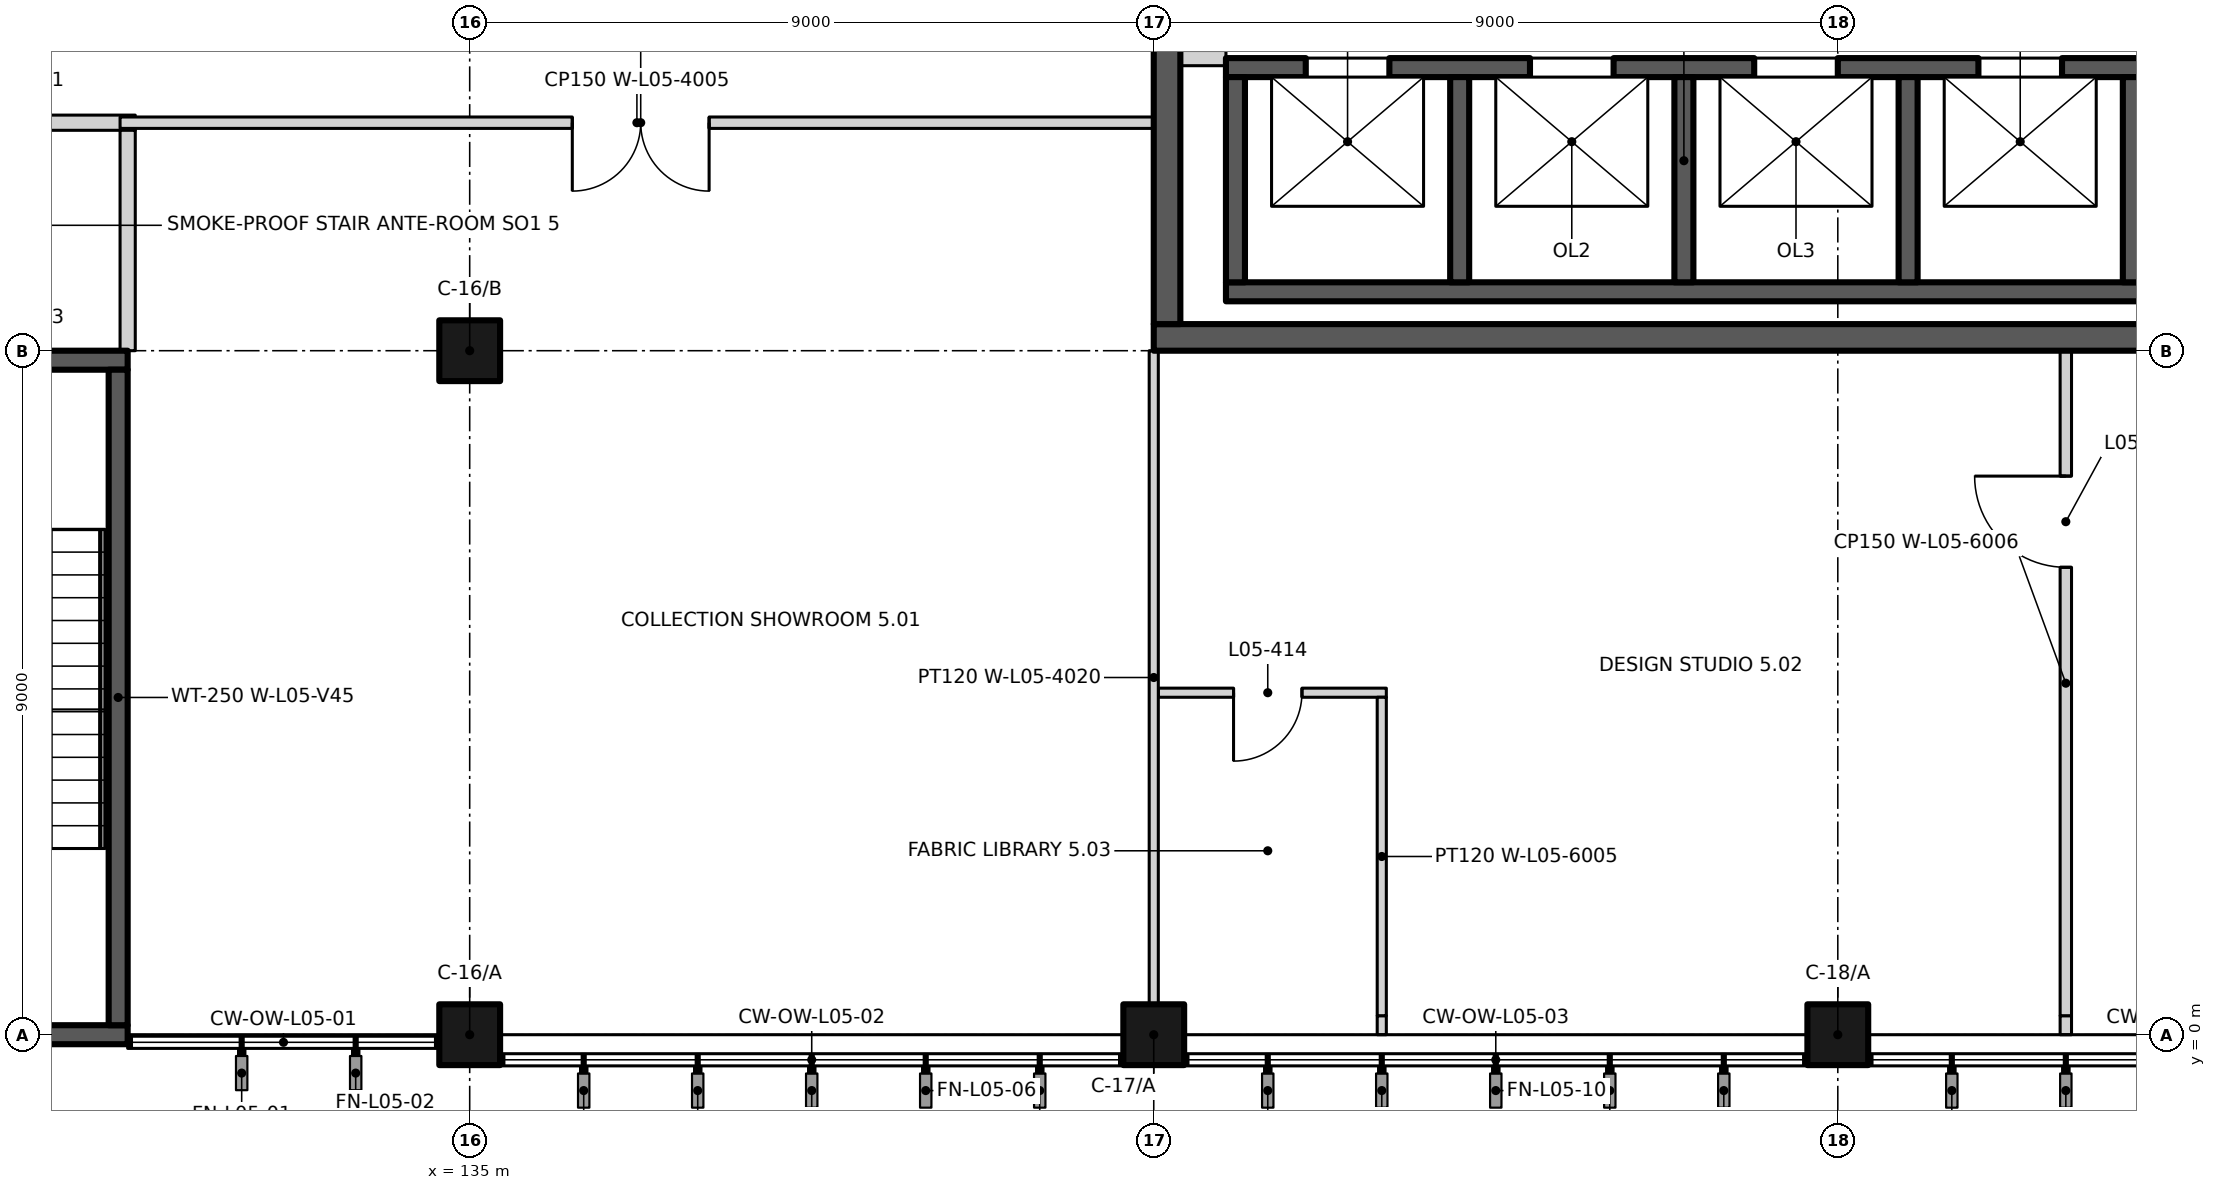
"""IFC4 building model, lengths in metres.
Left out: names, types, materials, properties, quantities, classifications, styles, units other than length and angle.
Written with IfcOpenShell. Run it as: python <this file> out.ifc"""

import sys

from ifc_helpers import new_model, si_unit, direction, frame, frame_2d, origin, origin_2d, place, context, subcontext, project, spatial, rectangle, extrude, element, fill, save


model = new_model("IFC4")
c1 = context("Model", 3, precision=1e-05, world=origin(), true_north=direction((0.0, 1.0)))
c2 = subcontext(c1, "Body", "Model", "MODEL_VIEW")
j1 = project(units=[si_unit("LENGTHUNIT", "METRE"), si_unit("PLANEANGLEUNIT", "RADIAN")], contexts=[c1])
p1 = place(None, origin())
s1 = spatial("IfcSite", under=j1, at=p1, CompositionType="ELEMENT")
p2 = place(p1, origin())
s2 = spatial("IfcBuilding", under=s1, at=p2, CompositionType="ELEMENT")
p3 = place(p2, frame((0.0, 0.0, 24.0)))
s3 = spatial("IfcBuildingStorey", under=s2, at=p3, CompositionType="ELEMENT", Elevation=24.0)
for number, where, z_axis, x_axis in (
    (1, (135.0, 0.0, 0.0), (0.0, 0.0, 1.0), (1.0, 0.0, 0.0)),
    (2, (144.0, 0.0, 0.0), (0.0, 0.0, 1.0), (1.0, 0.0, 0.0)),
    (3, (153.0, 0.0, 0.0), (0.0, 0.0, 1.0), (1.0, 0.0, 0.0)),
    (4, (135.0, 9.0, 0.0), (0.0, 0.0, 1.0), (1.0, 0.0, 0.0)),
):
    element("IfcColumn", number, at=place(p3, frame(where, z_axis=z_axis, x_axis=x_axis)), inside=s3, PredefinedType="COLUMN", context=c2, shape_type="SweptSolid", body=[
        extrude(rectangle(XDim=0.8, YDim=0.8, at=origin_2d()), origin(), (0.0, 0.0, 1.0), 4.5),
    ])
p4 = place(p3, frame((128.188, 0.0, 0.0), z_axis=(0.0, 0.0, 1.0), x_axis=(1.0, 0.0, 0.0)))
e5 = element("IfcWall", 5, at=p4, inside=s3, PredefinedType="SHEAR", context=c2, shape_type="SweptSolid", body=[
    extrude(rectangle(XDim=2.312, YDim=0.25, at=frame_2d((1.156, 0.0))), origin(), (0.0, 0.0, 1.0), 4.5),
])
p5 = place(p3, frame((126.4, 8.875, 0.0), z_axis=(0.0, 0.0, 1.0), x_axis=(1.0, 0.0, 0.0)))
e6 = element("IfcWall", 6, at=p5, inside=s3, PredefinedType="SHEAR", context=c2, shape_type="SweptSolid", body=[
    extrude(rectangle(XDim=4.1, YDim=0.25, at=frame_2d((2.05, 0.0))), origin(), (0.0, 0.0, 1.0), 4.5),
])
p6 = place(p5, frame((2.4, 0.0, 0.0), z_axis=(0.0, 0.0, 1.0), x_axis=(-1.0, 0.0, 0.0)))
e7 = element("IfcOpeningElement", 7, at=p6, cuts=e6, PredefinedType="OPENING", context=c2, shape_type="SweptSolid", body=[
    extrude(rectangle(XDim=1.1, YDim=2.1, at=frame_2d((0.55, 1.05))), frame((0.0, 0.135, 0.0), z_axis=(0.0, -1.0, 0.0), x_axis=(1.0, 0.0, 0.0)), (0.0, 0.0, 1.0), 0.27),
])
p7 = place(p3, frame((130.375, 0.125, 0.0), z_axis=(0.0, 0.0, 1.0), x_axis=(0.0, 1.0, 0.0)))
e8 = element("IfcWall", 8, at=p7, inside=s3, PredefinedType="SHEAR", context=c2, shape_type="SweptSolid", body=[
    extrude(rectangle(XDim=8.625, YDim=0.25, at=frame_2d((4.312, 0.0))), origin(), (0.0, 0.0, 1.0), 4.5),
])
p8 = place(p3, frame((144.95, 12.725, 0.0), z_axis=(0.0, 0.0, 1.0), x_axis=(1.0, 0.0, 0.0)))
e9 = element("IfcWall", 9, at=p8, inside=s3, PredefinedType="SHEAR", context=c2, shape_type="SweptSolid", body=[
    extrude(rectangle(XDim=12.05, YDim=0.25, at=frame_2d((6.025, 0.0))), origin(), (0.0, 0.0, 1.0), 4.5),
])
p9 = place(p8, frame((1.05, 0.0, 0.0)))
e10 = element("IfcOpeningElement", 10, at=p9, cuts=e9, PredefinedType="OPENING", context=c2, shape_type="SweptSolid", body=[
    extrude(rectangle(XDim=1.1, YDim=2.1, at=frame_2d((0.55, 1.05))), frame((0.0, 0.135, 0.0), z_axis=(0.0, -1.0, 0.0), x_axis=(1.0, 0.0, 0.0)), (0.0, 0.0, 1.0), 0.27),
])
p10 = place(p8, frame((4.0, 0.0, 0.0)))
e11 = element("IfcOpeningElement", 11, at=p10, cuts=e9, PredefinedType="OPENING", context=c2, shape_type="SweptSolid", body=[
    extrude(rectangle(XDim=1.1, YDim=2.1, at=frame_2d((0.55, 1.05))), frame((0.0, 0.135, 0.0), z_axis=(0.0, -1.0, 0.0), x_axis=(1.0, 0.0, 0.0)), (0.0, 0.0, 1.0), 0.27),
])
p11 = place(p8, frame((6.95, 0.0, 0.0)))
e12 = element("IfcOpeningElement", 12, at=p11, cuts=e9, PredefinedType="OPENING", context=c2, shape_type="SweptSolid", body=[
    extrude(rectangle(XDim=1.1, YDim=2.1, at=frame_2d((0.55, 1.05))), frame((0.0, 0.135, 0.0), z_axis=(0.0, -1.0, 0.0), x_axis=(1.0, 0.0, 0.0)), (0.0, 0.0, 1.0), 0.27),
])
p12 = place(p8, frame((9.9, 0.0, 0.0)))
e13 = element("IfcOpeningElement", 13, at=p12, cuts=e9, PredefinedType="OPENING", context=c2, shape_type="SweptSolid", body=[
    extrude(rectangle(XDim=1.1, YDim=2.1, at=frame_2d((0.55, 1.05))), frame((0.0, 0.135, 0.0), z_axis=(0.0, -1.0, 0.0), x_axis=(1.0, 0.0, 0.0)), (0.0, 0.0, 1.0), 0.27),
])
p13 = place(p3, frame((144.95, 9.775, 0.0), z_axis=(0.0, 0.0, 1.0), x_axis=(1.0, 0.0, 0.0)))
e14 = element("IfcWall", 14, at=p13, inside=s3, PredefinedType="SHEAR", context=c2, shape_type="SweptSolid", body=[
    extrude(rectangle(XDim=12.05, YDim=0.25, at=frame_2d((6.025, 0.0))), origin(), (0.0, 0.0, 1.0), 4.5),
])
for number, where, z_axis, x_axis in (
    (15, (145.075, 9.9, 0.0), (0.0, 0.0, 1.0), (0.0, 1.0, 0.0)),
    (16, (148.025, 9.9, 0.0), (0.0, 0.0, 1.0), (0.0, 1.0, 0.0)),
    (17, (150.975, 9.9, 0.0), (0.0, 0.0, 1.0), (0.0, 1.0, 0.0)),
    (18, (153.925, 9.9, 0.0), (0.0, 0.0, 1.0), (0.0, 1.0, 0.0)),
    (19, (156.875, 9.9, 0.0), (0.0, 0.0, 1.0), (0.0, 1.0, 0.0)),
):
    element("IfcWall", number, at=place(p3, frame(where, z_axis=z_axis, x_axis=x_axis)), inside=s3, PredefinedType="SHEAR", context=c2, shape_type="SweptSolid", body=[
        extrude(rectangle(XDim=2.7, YDim=0.25, at=frame_2d((1.35, 0.0))), origin(), (0.0, 0.0, 1.0), 4.5),
    ])
p14 = place(p3, frame((144.06, 4.5, 0.0), z_axis=(0.0, 0.0, 1.0), x_axis=(1.0, 0.0, 0.0)))
e20 = element("IfcWall", 20, at=p14, inside=s3, PredefinedType="PARTITIONING", context=c2, shape_type="SweptSolid", body=[
    extrude(rectangle(XDim=3.0, YDim=0.12, at=frame_2d((1.5, 0.0))), origin(), (0.0, 0.0, 1.0), 4.2),
])
p15 = place(p14, frame((1.89, 0.0, 0.0), z_axis=(0.0, 0.0, 1.0), x_axis=(-1.0, 0.0, 0.0)))
e21 = element("IfcOpeningElement", 21, at=p15, cuts=e20, PredefinedType="OPENING", context=c2, shape_type="SweptSolid", body=[
    extrude(rectangle(XDim=0.9, YDim=2.1, at=frame_2d((0.45, 1.05))), frame((0.0, 0.07, 0.0), z_axis=(0.0, -1.0, 0.0), x_axis=(1.0, 0.0, 0.0)), (0.0, 0.0, 1.0), 0.14),
])
p16 = place(p3, frame((144.0, 9.175, 0.0), z_axis=(0.0, 0.0, 1.0), x_axis=(1.0, 0.0, 0.0)))
e22 = element("IfcWall", 22, at=p16, inside=s3, PredefinedType="SHEAR", context=c2, shape_type="SweptSolid", body=[
    extrude(rectangle(XDim=18.0, YDim=0.35, at=frame_2d((9.0, 0.0))), origin(), (0.0, 0.0, 1.0), 4.2),
])
p17 = place(p16, frame((16.463, 0.0, 0.0), z_axis=(0.0, 0.0, 1.0), x_axis=(-1.0, 0.0, 0.0)))
e23 = element("IfcOpeningElement", 23, at=p17, cuts=e22, PredefinedType="OPENING", context=c2, shape_type="SweptSolid", body=[
    extrude(rectangle(XDim=2.1, YDim=2.4, at=frame_2d((1.05, 1.2))), frame((0.0, 0.185, 0.0), z_axis=(0.0, -1.0, 0.0), x_axis=(1.0, 0.0, 0.0)), (0.0, 0.0, 1.0), 0.37),
])
p18 = place(p3, frame((126.25, 12.0, 0.0), z_axis=(0.0, 0.0, 1.0), x_axis=(1.0, 0.0, 0.0)))
e24 = element("IfcWall", 24, at=p18, inside=s3, PredefinedType="PARTITIONING", context=c2, shape_type="SweptSolid", body=[
    extrude(rectangle(XDim=4.35, YDim=0.2, at=frame_2d((2.175, 0.0))), origin(), (0.0, 0.0, 1.0), 4.2),
])
p19 = place(p18, frame((2.6, 0.0, 0.0), z_axis=(0.0, 0.0, 1.0), x_axis=(-1.0, 0.0, 0.0)))
e25 = element("IfcOpeningElement", 25, at=p19, cuts=e24, PredefinedType="OPENING", context=c2, shape_type="SweptSolid", body=[
    extrude(rectangle(XDim=1.2, YDim=2.1, at=frame_2d((0.6, 1.05))), frame((0.0, 0.11, 0.0), z_axis=(0.0, -1.0, 0.0), x_axis=(1.0, 0.0, 0.0)), (0.0, 0.0, 1.0), 0.22),
])
p20 = place(p3, frame((130.4, 12.0, 0.0), z_axis=(0.0, 0.0, 1.0), x_axis=(1.0, 0.0, 0.0)))
e26 = element("IfcWall", 26, at=p20, inside=s3, PredefinedType="PARTITIONING", context=c2, shape_type="SweptSolid", body=[
    extrude(rectangle(XDim=13.6, YDim=0.15, at=frame_2d((6.8, 0.0))), origin(), (0.0, 0.0, 1.0), 4.2),
])
p21 = place(p20, frame((7.75, 0.0, 0.0), z_axis=(0.0, 0.0, 1.0), x_axis=(-1.0, 0.0, 0.0)))
e27 = element("IfcOpeningElement", 27, at=p21, cuts=e26, PredefinedType="OPENING", context=c2, shape_type="SweptSolid", body=[
    extrude(rectangle(XDim=1.8, YDim=2.1, at=frame_2d((0.9, 1.05))), frame((0.0, 0.085, 0.0), z_axis=(0.0, -1.0, 0.0), x_axis=(1.0, 0.0, 0.0)), (0.0, 0.0, 1.0), 0.17),
])
p22 = place(p3, frame((144.35, 12.85, 0.0), z_axis=(0.0, 0.0, 1.0), x_axis=(1.0, 0.0, 0.0)))
e28 = element("IfcWall", 28, at=p22, inside=s3, PredefinedType="PARTITIONING", context=c2, shape_type="SweptSolid", body=[
    extrude(rectangle(XDim=0.6, YDim=0.2, at=frame_2d((0.3, 0.0))), origin(), (0.0, 0.0, 1.0), 4.2),
])
p23 = place(p3, frame((130.5, 9.0, 0.0), z_axis=(0.0, 0.0, 1.0), x_axis=(0.0, 1.0, 0.0)))
e29 = element("IfcWall", 29, at=p23, inside=s3, PredefinedType="PARTITIONING", context=c2, shape_type="SweptSolid", body=[
    extrude(rectangle(XDim=2.9, YDim=0.2, at=frame_2d((1.45, 0.0))), origin(), (0.0, 0.0, 1.0), 4.2),
])
p24 = place(p3, frame((144.0, 0.4, 0.0), z_axis=(0.0, 0.0, 1.0), x_axis=(0.0, 1.0, 0.0)))
e30 = element("IfcWall", 30, at=p24, inside=s3, PredefinedType="PARTITIONING", context=c2, shape_type="SweptSolid", body=[
    extrude(rectangle(XDim=8.6, YDim=0.12, at=frame_2d((4.3, 0.0))), origin(), (0.0, 0.0, 1.0), 4.2),
])
p25 = place(p3, frame((144.175, 9.35, 0.0), z_axis=(0.0, 0.0, 1.0), x_axis=(0.0, 1.0, 0.0)))
e31 = element("IfcWall", 31, at=p25, inside=s3, PredefinedType="SHEAR", context=c2, shape_type="SweptSolid", body=[
    extrude(rectangle(XDim=17.4, YDim=0.35, at=frame_2d((8.7, 0.0))), origin(), (0.0, 0.0, 1.0), 4.2),
])
p26 = place(p25, frame((3.75, 0.0, 0.0)))
e32 = element("IfcOpeningElement", 32, at=p26, cuts=e31, PredefinedType="OPENING", context=c2, shape_type="SweptSolid", body=[
    extrude(rectangle(XDim=1.6, YDim=2.4, at=frame_2d((0.8, 1.2))), frame((0.0, 0.185, 0.0), z_axis=(0.0, -1.0, 0.0), x_axis=(1.0, 0.0, 0.0)), (0.0, 0.0, 1.0), 0.37),
])
p27 = place(p3, frame((147.0, 0.0, 0.0), z_axis=(0.0, 0.0, 1.0), x_axis=(0.0, 1.0, 0.0)))
e33 = element("IfcWall", 33, at=p27, inside=s3, PredefinedType="PARTITIONING", context=c2, shape_type="SweptSolid", body=[
    extrude(rectangle(XDim=0.25, YDim=0.12, at=frame_2d((0.125, 0.0))), origin(), (0.0, 0.0, 1.0), 3.6),
])
p28 = place(p3, frame((147.0, 0.25, 0.0), z_axis=(0.0, 0.0, 1.0), x_axis=(0.0, 1.0, 0.0)))
e34 = element("IfcWall", 34, at=p28, inside=s3, PredefinedType="PARTITIONING", context=c2, shape_type="SweptSolid", body=[
    extrude(rectangle(XDim=4.19, YDim=0.12, at=frame_2d((2.095, 0.0))), origin(), (0.0, 0.0, 1.0), 4.2),
])
p29 = place(p3, frame((156.0, 0.0, 0.0), z_axis=(0.0, 0.0, 1.0), x_axis=(0.0, 1.0, 0.0)))
e35 = element("IfcWall", 35, at=p29, inside=s3, PredefinedType="PARTITIONING", context=c2, shape_type="SweptSolid", body=[
    extrude(rectangle(XDim=0.25, YDim=0.15, at=frame_2d((0.125, 0.0))), origin(), (0.0, 0.0, 1.0), 3.6),
])
p30 = place(p3, frame((156.0, 0.25, 0.0), z_axis=(0.0, 0.0, 1.0), x_axis=(0.0, 1.0, 0.0)))
e36 = element("IfcWall", 36, at=p30, inside=s3, PredefinedType="PARTITIONING", context=c2, shape_type="SweptSolid", body=[
    extrude(rectangle(XDim=8.75, YDim=0.15, at=frame_2d((4.375, 0.0))), origin(), (0.0, 0.0, 1.0), 4.2),
])
p31 = place(p30, frame((5.9, 0.0, 0.0)))
e37 = element("IfcOpeningElement", 37, at=p31, cuts=e36, PredefinedType="OPENING", context=c2, shape_type="SweptSolid", body=[
    extrude(rectangle(XDim=1.2, YDim=2.1, at=frame_2d((0.6, 1.05))), frame((0.0, 0.085, 0.0), z_axis=(0.0, -1.0, 0.0), x_axis=(1.0, 0.0, 0.0)), (0.0, 0.0, 1.0), 0.17),
])
p32 = place(p9, origin())
e38 = element("IfcDoor", 38, at=p32, inside=s3, OperationType="DOUBLE_DOOR_SLIDING", PredefinedType="DOOR", context=c2, shape_type="SweptSolid", body=[
    extrude(rectangle(XDim=1.1, YDim=2.1, at=frame_2d((0.55, 1.05))), frame((0.0, 0.025, 0.0), z_axis=(0.0, -1.0, 0.0), x_axis=(1.0, 0.0, 0.0)), (0.0, 0.0, 1.0), 0.05),
])
fill(e10, e38)
p33 = place(p10, origin())
e39 = element("IfcDoor", 39, at=p33, inside=s3, OperationType="DOUBLE_DOOR_SLIDING", PredefinedType="DOOR", context=c2, shape_type="SweptSolid", body=[
    extrude(rectangle(XDim=1.1, YDim=2.1, at=frame_2d((0.55, 1.05))), frame((0.0, 0.025, 0.0), z_axis=(0.0, -1.0, 0.0), x_axis=(1.0, 0.0, 0.0)), (0.0, 0.0, 1.0), 0.05),
])
fill(e11, e39)
p34 = place(p11, origin())
e40 = element("IfcDoor", 40, at=p34, inside=s3, OperationType="DOUBLE_DOOR_SLIDING", PredefinedType="DOOR", context=c2, shape_type="SweptSolid", body=[
    extrude(rectangle(XDim=1.1, YDim=2.1, at=frame_2d((0.55, 1.05))), frame((0.0, 0.025, 0.0), z_axis=(0.0, -1.0, 0.0), x_axis=(1.0, 0.0, 0.0)), (0.0, 0.0, 1.0), 0.05),
])
fill(e12, e40)
p35 = place(p12, origin())
e41 = element("IfcDoor", 41, at=p35, inside=s3, OperationType="DOUBLE_DOOR_SLIDING", PredefinedType="DOOR", context=c2, shape_type="SweptSolid", body=[
    extrude(rectangle(XDim=1.1, YDim=2.1, at=frame_2d((0.55, 1.05))), frame((0.0, 0.025, 0.0), z_axis=(0.0, -1.0, 0.0), x_axis=(1.0, 0.0, 0.0)), (0.0, 0.0, 1.0), 0.05),
])
fill(e13, e41)
p36 = place(p21, origin())
e42 = element("IfcDoor", 42, at=p36, inside=s3, OperationType="DOUBLE_DOOR_SINGLE_SWING", PredefinedType="DOOR", context=c2, shape_type="SweptSolid", body=[
    extrude(rectangle(XDim=1.8, YDim=2.1, at=frame_2d((0.9, 1.05))), frame((0.0, 0.025, 0.0), z_axis=(0.0, -1.0, 0.0), x_axis=(1.0, 0.0, 0.0)), (0.0, 0.0, 1.0), 0.05),
])
fill(e27, e42)
p37 = place(p31, origin())
e43 = element("IfcDoor", 43, at=p37, inside=s3, OperationType="SINGLE_SWING_RIGHT", PredefinedType="DOOR", context=c2, shape_type="SweptSolid", body=[
    extrude(rectangle(XDim=1.2, YDim=2.1, at=frame_2d((0.6, 1.05))), frame((0.0, 0.025, 0.0), z_axis=(0.0, -1.0, 0.0), x_axis=(1.0, 0.0, 0.0)), (0.0, 0.0, 1.0), 0.05),
])
fill(e37, e43)
p38 = place(p15, origin())
e44 = element("IfcDoor", 44, at=p38, inside=s3, OperationType="SINGLE_SWING_RIGHT", PredefinedType="DOOR", context=c2, shape_type="SweptSolid", body=[
    extrude(rectangle(XDim=0.9, YDim=2.1, at=frame_2d((0.45, 1.05))), frame((0.0, 0.025, 0.0), z_axis=(0.0, -1.0, 0.0), x_axis=(1.0, 0.0, 0.0)), (0.0, 0.0, 1.0), 0.05),
])
fill(e21, e44)
save(model, sys.argv[1])
